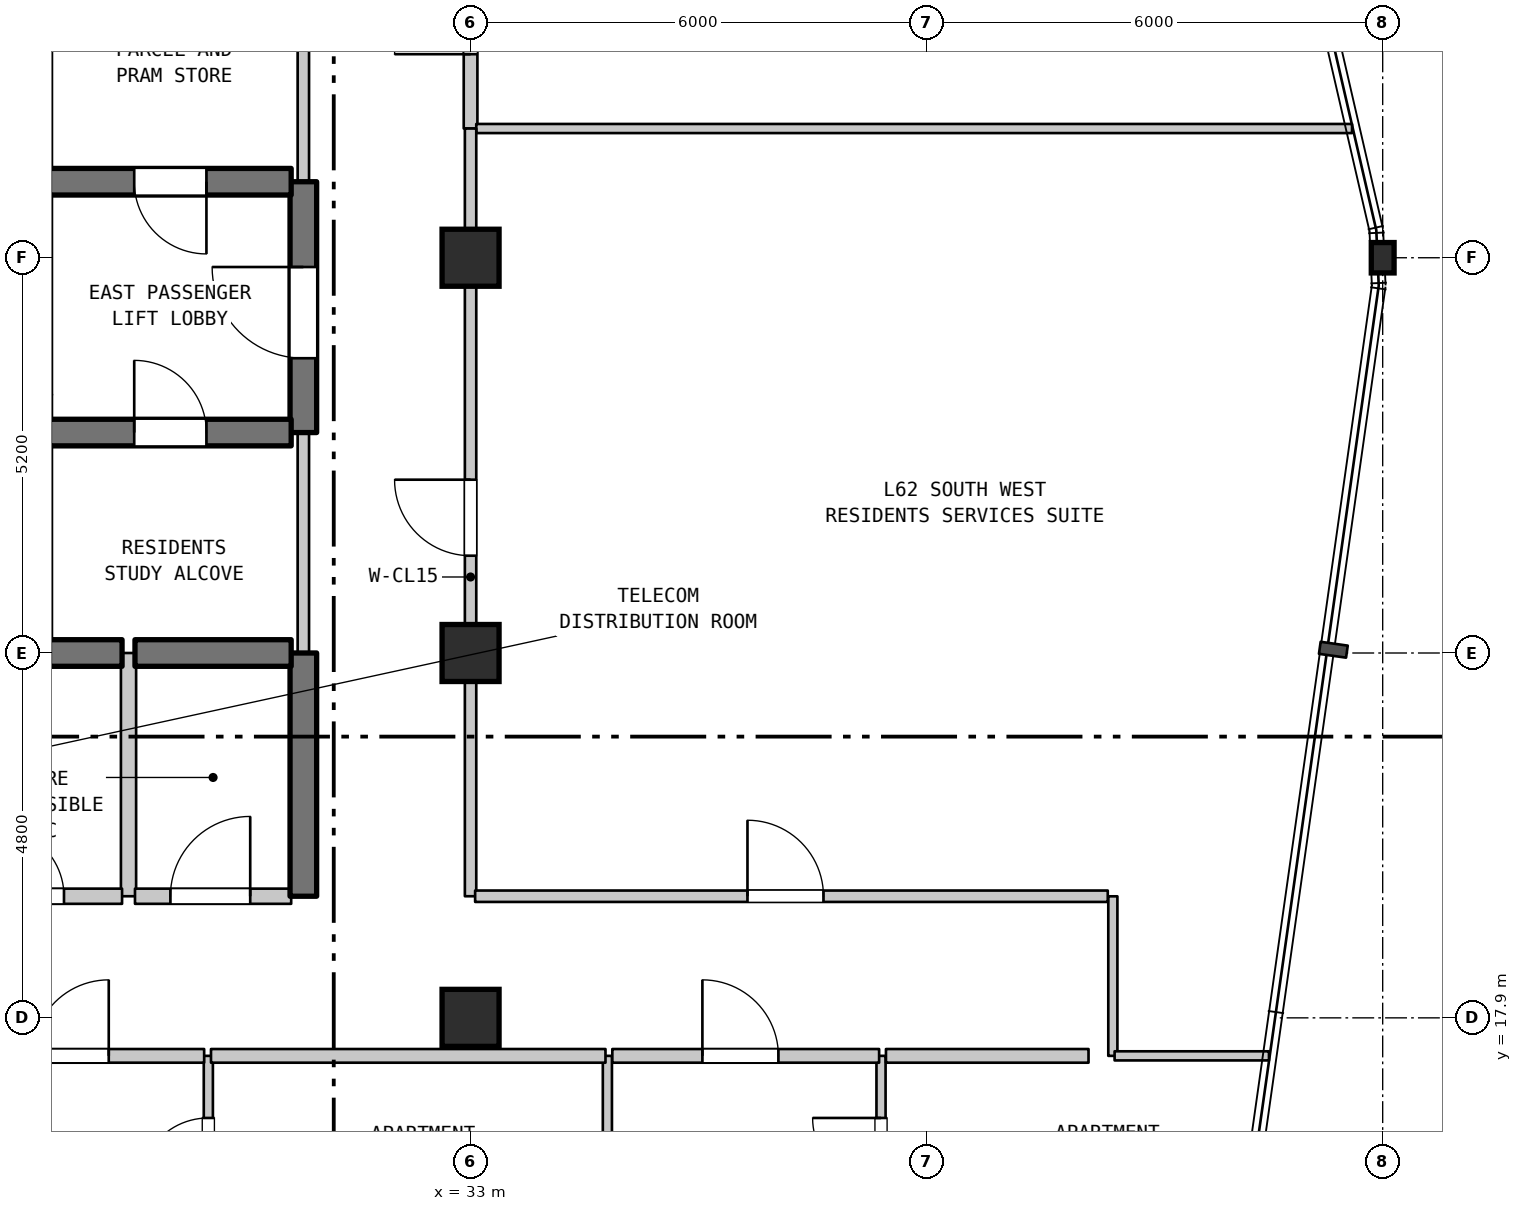
"""IFC4 building model, lengths in metres.
Left out: names, types, materials, properties, quantities, classifications, styles, units other than length and angle.
Written with IfcOpenShell. Run it as: python <this file> out.ifc"""

import sys

from ifc_helpers import new_model, si_unit, direction, frame, frame_2d, origin, origin_2d, place, context, subcontext, project, spatial, rectangle, i_section, extrude, element, fill, save


model = new_model("IFC4")
c1 = context("Model", 3, precision=1e-05, world=origin(), true_north=direction((0.0, 1.0)))
c2 = subcontext(c1, "Body", "Model", "MODEL_VIEW")
j1 = project(units=[si_unit("LENGTHUNIT", "METRE"), si_unit("PLANEANGLEUNIT", "RADIAN")], contexts=[c1])
p1 = place(None, origin())
s1 = spatial("IfcSite", under=j1, at=p1, CompositionType="ELEMENT")
p2 = place(p1, origin())
s2 = spatial("IfcBuilding", under=s1, at=p2, CompositionType="ELEMENT")
p3 = place(p2, frame((0.0, 0.0, 251.0)))
s3 = spatial("IfcBuildingStorey", under=s2, at=p3, CompositionType="ELEMENT", Elevation=251.0)
for number, where, z_axis, x_axis in (
    (1, (33.0, 17.9, 0.0), (0.0, 0.0, 1.0), (1.0, 0.0, 0.0)),
    (2, (33.0, 22.7, 0.0), (0.0, 0.0, 1.0), (1.0, 0.0, 0.0)),
    (3, (33.0, 27.9, 0.0), (0.0, 0.0, 1.0), (1.0, 0.0, 0.0)),
):
    element("IfcColumn", number, at=place(p3, frame(where, z_axis=z_axis, x_axis=x_axis)), inside=s3, PredefinedType="COLUMN", context=c2, shape_type="SweptSolid", body=[
        extrude(rectangle(XDim=0.75, YDim=0.75, at=origin_2d()), origin(), (0.0, 0.0, 1.0), 3.7),
    ])
p4 = place(p3, frame((45.0, 27.9, 0.0), z_axis=(0.0, 0.0, 1.0), x_axis=(1.0, 0.0, 0.0)))
e4 = element("IfcColumn", 4, at=p4, inside=s3, PredefinedType="COLUMN", context=c2, shape_type="SweptSolid", body=[
    extrude(i_section(OverallWidth=0.3, OverallDepth=0.4, WebThickness=0.013, FlangeThickness=0.024, FilletRadius=0.027, at=origin_2d()), origin(), (0.0, 0.0, 1.0), 3.7),
])
p5 = place(p3, frame((28.5, 19.5, 0.0), z_axis=(0.0, 0.0, 1.0), x_axis=(0.0, 1.0, 0.0)))
e5 = element("IfcWall", 5, at=p5, inside=s3, PredefinedType="STANDARD", context=c2, shape_type="SweptSolid", body=[
    extrude(rectangle(XDim=3.2, YDim=0.2, at=frame_2d((1.6, 0.0))), origin(), (0.0, 0.0, 1.0), 3.39),
])
p6 = place(p3, frame((29.55, 15.008, 0.0), z_axis=(0.0, 0.0, 1.0), x_axis=(0.0, 1.0, 0.0)))
e6 = element("IfcWall", 6, at=p6, inside=s3, PredefinedType="PARTITIONING", context=c2, shape_type="SweptSolid", body=[
    extrude(rectangle(XDim=2.392, YDim=0.12, at=frame_2d((1.196, 0.0))), origin(), (0.0, 0.0, 1.0), 3.39),
])
p7 = place(p6, frame((0.675, 0.0, 0.0)))
e7 = element("IfcOpeningElement", 7, at=p7, cuts=e6, PredefinedType="OPENING", context=c2, shape_type="SweptSolid", body=[
    extrude(rectangle(XDim=0.9, YDim=2.1, at=frame_2d((0.45, 1.05))), frame((0.0, 0.07, 0.0), z_axis=(0.0, -1.0, 0.0), x_axis=(1.0, 0.0, 0.0)), (0.0, 0.0, 1.0), 0.14),
])
p8 = place(p3, frame((30.8, 19.5, 0.0), z_axis=(0.0, 0.0, 1.0), x_axis=(0.0, 1.0, 0.0)))
e8 = element("IfcWall", 8, at=p8, inside=s3, PredefinedType="SHEAR", context=c2, shape_type="SweptSolid", body=[
    extrude(rectangle(XDim=3.2, YDim=0.35, at=frame_2d((1.6, 0.0))), origin(), (0.0, 0.0, 1.0), 3.39),
])
p9 = place(p3, frame((30.8, 22.7, 0.0), z_axis=(0.0, 0.0, 1.0), x_axis=(0.0, 1.0, 0.0)))
e9 = element("IfcWall", 9, at=p9, inside=s3, PredefinedType="STANDARD", context=c2, shape_type="SweptSolid", body=[
    extrude(rectangle(XDim=2.9, YDim=0.15, at=frame_2d((1.45, 0.0))), origin(), (0.0, 0.0, 1.0), 3.39),
])
p10 = place(p3, frame((30.8, 25.6, 0.0), z_axis=(0.0, 0.0, 1.0), x_axis=(0.0, 1.0, 0.0)))
e10 = element("IfcWall", 10, at=p10, inside=s3, PredefinedType="SHEAR", context=c2, shape_type="SweptSolid", body=[
    extrude(rectangle(XDim=3.3, YDim=0.35, at=frame_2d((1.65, 0.0))), origin(), (0.0, 0.0, 1.0), 3.39),
])
p11 = place(p10, frame((0.978, 0.0, 0.0)))
e11 = element("IfcOpeningElement", 11, at=p11, cuts=e10, PredefinedType="OPENING", context=c2, shape_type="SweptSolid", body=[
    extrude(rectangle(XDim=1.2, YDim=2.2, at=frame_2d((0.6, 1.1))), frame((0.0, 0.185, 0.0), z_axis=(0.0, -1.0, 0.0), x_axis=(1.0, 0.0, 0.0)), (0.0, 0.0, 1.0), 0.37),
])
p12 = place(p3, frame((30.8, 28.9, 0.0), z_axis=(0.0, 0.0, 1.0), x_axis=(0.0, 1.0, 0.0)))
e12 = element("IfcWall", 12, at=p12, inside=s3, PredefinedType="STANDARD", context=c2, shape_type="SweptSolid", body=[
    extrude(rectangle(XDim=2.6, YDim=0.15, at=frame_2d((1.3, 0.0))), origin(), (0.0, 0.0, 1.0), 3.39),
])
p13 = place(p3, frame((33.0, 19.5, 0.0), z_axis=(0.0, 0.0, 1.0), x_axis=(0.0, 1.0, 0.0)))
e13 = element("IfcWall", 13, at=p13, inside=s3, PredefinedType="STANDARD", context=c2, shape_type="SweptSolid", body=[
    extrude(rectangle(XDim=8.4, YDim=0.15, at=frame_2d((4.2, 0.0))), origin(), (0.0, 0.0, 1.0), 3.1),
])
p14 = place(p13, frame((4.48, 0.0, 0.0)))
e14 = element("IfcOpeningElement", 14, at=p14, cuts=e13, PredefinedType="OPENING", context=c2, shape_type="SweptSolid", body=[
    extrude(rectangle(XDim=1.0, YDim=2.15, at=frame_2d((0.5, 1.075))), frame((0.0, 0.085, 0.0), z_axis=(0.0, -1.0, 0.0), x_axis=(1.0, 0.0, 0.0)), (0.0, 0.0, 1.0), 0.17),
])
p15 = place(p3, frame((33.0, 29.6, 0.0), z_axis=(0.0, 0.0, 1.0), x_axis=(0.0, 1.0, 0.0)))
e15 = element("IfcWall", 15, at=p15, inside=s3, PredefinedType="STANDARD", context=c2, shape_type="SweptSolid", body=[
    extrude(rectangle(XDim=3.1, YDim=0.18, at=frame_2d((1.55, 0.0))), origin(), (0.0, 0.0, 1.0), 2.89),
])
p16 = place(p15, frame((0.978, 0.0, 0.0)))
e16 = element("IfcOpeningElement", 16, at=p16, cuts=e15, PredefinedType="OPENING", context=c2, shape_type="SweptSolid", body=[
    extrude(rectangle(XDim=1.0, YDim=2.15, at=frame_2d((0.5, 1.075))), frame((0.0, 0.1, 0.0), z_axis=(0.0, -1.0, 0.0), x_axis=(1.0, 0.0, 0.0)), (0.0, 0.0, 1.0), 0.2),
])
p17 = place(p3, frame((34.8, 15.008, 0.0), z_axis=(0.0, 0.0, 1.0), x_axis=(0.0, 1.0, 0.0)))
e17 = element("IfcWall", 17, at=p17, inside=s3, PredefinedType="PARTITIONING", context=c2, shape_type="SweptSolid", body=[
    extrude(rectangle(XDim=2.392, YDim=0.12, at=frame_2d((1.196, 0.0))), origin(), (0.0, 0.0, 1.0), 3.39),
])
p18 = place(p3, frame((38.4, 15.008, 0.0), z_axis=(0.0, 0.0, 1.0), x_axis=(0.0, 1.0, 0.0)))
e18 = element("IfcWall", 18, at=p18, inside=s3, PredefinedType="PARTITIONING", context=c2, shape_type="SweptSolid", body=[
    extrude(rectangle(XDim=2.392, YDim=0.12, at=frame_2d((1.196, 0.0))), origin(), (0.0, 0.0, 1.0), 3.39),
])
p19 = place(p18, frame((0.675, 0.0, 0.0)))
e19 = element("IfcOpeningElement", 19, at=p19, cuts=e18, PredefinedType="OPENING", context=c2, shape_type="SweptSolid", body=[
    extrude(rectangle(XDim=0.9, YDim=2.1, at=frame_2d((0.45, 1.05))), frame((0.0, 0.07, 0.0), z_axis=(0.0, -1.0, 0.0), x_axis=(1.0, 0.0, 0.0)), (0.0, 0.0, 1.0), 0.14),
])
p20 = place(p3, frame((41.45, 17.4, 0.0), z_axis=(0.0, 0.0, 1.0), x_axis=(0.0, 1.0, 0.0)))
e20 = element("IfcWall", 20, at=p20, inside=s3, PredefinedType="PARTITIONING", context=c2, shape_type="SweptSolid", body=[
    extrude(rectangle(XDim=2.099, YDim=0.12, at=frame_2d((1.05, 0.0))), origin(), (0.0, 0.0, 1.0), 3.39),
])
p21 = place(p3, frame((25.985, 17.4, 0.0), z_axis=(0.0, 0.0, 1.0), x_axis=(1.0, 0.0, 0.0)))
e21 = element("IfcWall", 21, at=p21, inside=s3, PredefinedType="STANDARD", context=c2, shape_type="SweptSolid", body=[
    extrude(rectangle(XDim=3.51, YDim=0.18, at=frame_2d((1.755, 0.0))), origin(), (0.0, 0.0, 1.0), 3.39),
])
p22 = place(p21, frame((1.255, 0.0, 0.0)))
e22 = element("IfcOpeningElement", 22, at=p22, cuts=e21, PredefinedType="OPENING", context=c2, shape_type="SweptSolid", body=[
    extrude(rectangle(XDim=1.0, YDim=2.15, at=frame_2d((0.5, 1.075))), frame((0.0, 0.1, 0.0), z_axis=(0.0, -1.0, 0.0), x_axis=(1.0, 0.0, 0.0)), (0.0, 0.0, 1.0), 0.2),
])
p23 = place(p3, frame((29.585, 17.4, 0.0), z_axis=(0.0, 0.0, 1.0), x_axis=(1.0, 0.0, 0.0)))
e23 = element("IfcWall", 23, at=p23, inside=s3, PredefinedType="STANDARD", context=c2, shape_type="SweptSolid", body=[
    extrude(rectangle(XDim=5.19, YDim=0.18, at=frame_2d((2.595, 0.0))), origin(), (0.0, 0.0, 1.0), 3.39),
])
p24 = place(p3, frame((34.865, 17.4, 0.0), z_axis=(0.0, 0.0, 1.0), x_axis=(1.0, 0.0, 0.0)))
e24 = element("IfcWall", 24, at=p24, inside=s3, PredefinedType="STANDARD", context=c2, shape_type="SweptSolid", body=[
    extrude(rectangle(XDim=3.51, YDim=0.18, at=frame_2d((1.755, 0.0))), origin(), (0.0, 0.0, 1.0), 3.39),
])
p25 = place(p24, frame((1.185, 0.0, 0.0)))
e25 = element("IfcOpeningElement", 25, at=p25, cuts=e24, PredefinedType="OPENING", context=c2, shape_type="SweptSolid", body=[
    extrude(rectangle(XDim=1.0, YDim=2.15, at=frame_2d((0.5, 1.075))), frame((0.0, 0.1, 0.0), z_axis=(0.0, -1.0, 0.0), x_axis=(1.0, 0.0, 0.0)), (0.0, 0.0, 1.0), 0.2),
])
p26 = place(p3, frame((38.465, 17.4, 0.0), z_axis=(0.0, 0.0, 1.0), x_axis=(1.0, 0.0, 0.0)))
e26 = element("IfcWall", 26, at=p26, inside=s3, PredefinedType="STANDARD", context=c2, shape_type="SweptSolid", body=[
    extrude(rectangle(XDim=2.665, YDim=0.18, at=frame_2d((1.333, 0.0))), origin(), (0.0, 0.0, 1.0), 3.39),
])
p27 = place(p3, frame((41.473, 17.4, 0.0), z_axis=(0.0, 0.0, 1.0), x_axis=(1.0, 0.0, 0.0)))
e27 = element("IfcWall", 27, at=p27, inside=s3, PredefinedType="PARTITIONING", context=c2, shape_type="SweptSolid", body=[
    extrude(rectangle(XDim=2.031, YDim=0.12, at=frame_2d((1.016, 0.0))), origin(), (0.0, 0.0, 1.0), 3.39),
])
p28 = place(p3, frame((23.96, 19.5, 0.0), z_axis=(0.0, 0.0, 1.0), x_axis=(1.0, 0.0, 0.0)))
e28 = element("IfcWall", 28, at=p28, inside=s3, PredefinedType="STANDARD", context=c2, shape_type="SweptSolid", body=[
    extrude(rectangle(XDim=4.455, YDim=0.2, at=frame_2d((2.228, 0.0))), origin(), (0.0, 0.0, 1.0), 3.39),
])
p29 = place(p28, frame((0.665, 0.0, 0.0)))
e29 = element("IfcOpeningElement", 29, at=p29, cuts=e28, PredefinedType="OPENING", context=c2, shape_type="SweptSolid", body=[
    extrude(rectangle(XDim=0.9, YDim=2.15, at=frame_2d((0.45, 1.075))), frame((0.0, 0.11, 0.0), z_axis=(0.0, -1.0, 0.0), x_axis=(1.0, 0.0, 0.0)), (0.0, 0.0, 1.0), 0.22),
])
p30 = place(p28, frame((2.791, 0.0, 0.0)))
e30 = element("IfcOpeningElement", 30, at=p30, cuts=e28, PredefinedType="OPENING", context=c2, shape_type="SweptSolid", body=[
    extrude(rectangle(XDim=0.9, YDim=2.15, at=frame_2d((0.45, 1.075))), frame((0.0, 0.11, 0.0), z_axis=(0.0, -1.0, 0.0), x_axis=(1.0, 0.0, 0.0)), (0.0, 0.0, 1.0), 0.22),
])
p31 = place(p3, frame((28.585, 19.5, 0.0), z_axis=(0.0, 0.0, 1.0), x_axis=(1.0, 0.0, 0.0)))
e31 = element("IfcWall", 31, at=p31, inside=s3, PredefinedType="STANDARD", context=c2, shape_type="SweptSolid", body=[
    extrude(rectangle(XDim=2.055, YDim=0.2, at=frame_2d((1.027, 0.0))), origin(), (0.0, 0.0, 1.0), 3.39),
])
p32 = place(p31, frame((0.466, 0.0, 0.0)))
e32 = element("IfcOpeningElement", 32, at=p32, cuts=e31, PredefinedType="OPENING", context=c2, shape_type="SweptSolid", body=[
    extrude(rectangle(XDim=1.05, YDim=2.15, at=frame_2d((0.525, 1.075))), frame((0.0, 0.11, 0.0), z_axis=(0.0, -1.0, 0.0), x_axis=(1.0, 0.0, 0.0)), (0.0, 0.0, 1.0), 0.22),
])
p33 = place(p3, frame((33.06, 19.5, 0.0), z_axis=(0.0, 0.0, 1.0), x_axis=(1.0, 0.0, 0.0)))
e33 = element("IfcWall", 33, at=p33, inside=s3, PredefinedType="STANDARD", context=c2, shape_type="SweptSolid", body=[
    extrude(rectangle(XDim=8.323, YDim=0.15, at=frame_2d((4.162, 0.0))), origin(), (0.0, 0.0, 1.0), 3.39),
])
p34 = place(p33, frame((3.583, 0.0, 0.0)))
e34 = element("IfcOpeningElement", 34, at=p34, cuts=e33, PredefinedType="OPENING", context=c2, shape_type="SweptSolid", body=[
    extrude(rectangle(XDim=1.0, YDim=2.15, at=frame_2d((0.5, 1.075))), frame((0.0, 0.085, 0.0), z_axis=(0.0, -1.0, 0.0), x_axis=(1.0, 0.0, 0.0)), (0.0, 0.0, 1.0), 0.17),
])
p35 = place(p3, frame((27.46, 22.7, 0.0), z_axis=(0.0, 0.0, 1.0), x_axis=(1.0, 0.0, 0.0)))
e35 = element("IfcWall", 35, at=p35, inside=s3, PredefinedType="SHEAR", context=c2, shape_type="SweptSolid", body=[
    extrude(rectangle(XDim=0.955, YDim=0.35, at=frame_2d((0.478, 0.0))), origin(), (0.0, 0.0, 1.0), 3.39),
])
p36 = place(p3, frame((28.585, 22.7, 0.0), z_axis=(0.0, 0.0, 1.0), x_axis=(1.0, 0.0, 0.0)))
e36 = element("IfcWall", 36, at=p36, inside=s3, PredefinedType="SHEAR", context=c2, shape_type="SweptSolid", body=[
    extrude(rectangle(XDim=2.055, YDim=0.35, at=frame_2d((1.027, 0.0))), origin(), (0.0, 0.0, 1.0), 3.39),
])
p37 = place(p3, frame((27.46, 25.6, 0.0), z_axis=(0.0, 0.0, 1.0), x_axis=(1.0, 0.0, 0.0)))
e37 = element("IfcWall", 37, at=p37, inside=s3, PredefinedType="SHEAR", context=c2, shape_type="SweptSolid", body=[
    extrude(rectangle(XDim=3.18, YDim=0.35, at=frame_2d((1.59, 0.0))), origin(), (0.0, 0.0, 1.0), 3.39),
])
p38 = place(p37, frame((1.115, 0.0, 0.0)))
e38 = element("IfcOpeningElement", 38, at=p38, cuts=e37, PredefinedType="OPENING", context=c2, shape_type="SweptSolid", body=[
    extrude(rectangle(XDim=0.95, YDim=2.15, at=frame_2d((0.475, 1.075))), frame((0.0, 0.185, 0.0), z_axis=(0.0, -1.0, 0.0), x_axis=(1.0, 0.0, 0.0)), (0.0, 0.0, 1.0), 0.37),
])
p39 = place(p3, frame((27.46, 28.9, 0.0), z_axis=(0.0, 0.0, 1.0), x_axis=(1.0, 0.0, 0.0)))
e39 = element("IfcWall", 39, at=p39, inside=s3, PredefinedType="SHEAR", context=c2, shape_type="SweptSolid", body=[
    extrude(rectangle(XDim=3.18, YDim=0.35, at=frame_2d((1.59, 0.0))), origin(), (0.0, 0.0, 1.0), 3.39),
])
p40 = place(p39, frame((1.115, 0.0, 0.0)))
e40 = element("IfcOpeningElement", 40, at=p40, cuts=e39, PredefinedType="OPENING", context=c2, shape_type="SweptSolid", body=[
    extrude(rectangle(XDim=0.95, YDim=2.15, at=frame_2d((0.475, 1.075))), frame((0.0, 0.185, 0.0), z_axis=(0.0, -1.0, 0.0), x_axis=(1.0, 0.0, 0.0)), (0.0, 0.0, 1.0), 0.37),
])
p41 = place(p3, frame((33.075, 29.6, 0.0), z_axis=(0.0, 0.0, 1.0), x_axis=(1.0, 0.0, 0.0)))
e41 = element("IfcWall", 41, at=p41, inside=s3, PredefinedType="PARTITIONING", context=c2, shape_type="SweptSolid", body=[
    extrude(rectangle(XDim=11.522, YDim=0.12, at=frame_2d((5.761, 0.0))), origin(), (0.0, 0.0, 1.0), 3.39),
])
p42 = place(p3, frame((33.0, 27.9, 0.0), z_axis=(0.0, 0.0, 1.0), x_axis=(0.0, 1.0, 0.0)))
e42 = element("IfcWall", 42, at=p42, inside=s3, PredefinedType="STANDARD", context=c2, shape_type="SweptSolid", body=[
    extrude(rectangle(XDim=1.7, YDim=0.15, at=frame_2d((0.85, 0.0))), origin(), (0.0, 0.0, 1.0), 2.89),
])
p43 = place(p7, origin())
e43 = element("IfcDoor", 43, at=p43, inside=s3, OperationType="SINGLE_SWING_LEFT", PredefinedType="DOOR", context=c2, shape_type="SweptSolid", body=[
    extrude(rectangle(XDim=0.9, YDim=2.1, at=frame_2d((0.45, 1.05))), frame((0.0, 0.025, 0.0), z_axis=(0.0, -1.0, 0.0), x_axis=(1.0, 0.0, 0.0)), (0.0, 0.0, 1.0), 0.05),
])
fill(e7, e43)
p44 = place(p11, origin())
e44 = element("IfcDoor", 44, at=p44, inside=s3, OperationType="SINGLE_SWING_RIGHT", PredefinedType="DOOR", context=c2, shape_type="SweptSolid", body=[
    extrude(rectangle(XDim=1.2, YDim=2.2, at=frame_2d((0.6, 1.1))), frame((0.0, 0.025, 0.0), z_axis=(0.0, -1.0, 0.0), x_axis=(1.0, 0.0, 0.0)), (0.0, 0.0, 1.0), 0.05),
])
fill(e11, e44)
p45 = place(p14, origin())
e45 = element("IfcDoor", 45, at=p45, inside=s3, OperationType="SINGLE_SWING_RIGHT", PredefinedType="DOOR", context=c2, shape_type="SweptSolid", body=[
    extrude(rectangle(XDim=1.0, YDim=2.15, at=frame_2d((0.5, 1.075))), frame((0.0, 0.025, 0.0), z_axis=(0.0, -1.0, 0.0), x_axis=(1.0, 0.0, 0.0)), (0.0, 0.0, 1.0), 0.05),
])
fill(e14, e45)
p46 = place(p16, origin())
e46 = element("IfcDoor", 46, at=p46, inside=s3, OperationType="SINGLE_SWING_LEFT", PredefinedType="DOOR", context=c2, shape_type="SweptSolid", body=[
    extrude(rectangle(XDim=1.0, YDim=2.15, at=frame_2d((0.5, 1.075))), frame((0.0, 0.025, 0.0), z_axis=(0.0, -1.0, 0.0), x_axis=(1.0, 0.0, 0.0)), (0.0, 0.0, 1.0), 0.05),
])
fill(e16, e46)
p47 = place(p19, origin())
e47 = element("IfcDoor", 47, at=p47, inside=s3, OperationType="SINGLE_SWING_RIGHT", PredefinedType="DOOR", context=c2, shape_type="SweptSolid", body=[
    extrude(rectangle(XDim=0.9, YDim=2.1, at=frame_2d((0.45, 1.05))), frame((0.0, 0.025, 0.0), z_axis=(0.0, -1.0, 0.0), x_axis=(1.0, 0.0, 0.0)), (0.0, 0.0, 1.0), 0.05),
])
fill(e19, e47)
p48 = place(p22, origin())
e48 = element("IfcDoor", 48, at=p48, inside=s3, OperationType="SINGLE_SWING_RIGHT", PredefinedType="DOOR", context=c2, shape_type="SweptSolid", body=[
    extrude(rectangle(XDim=1.0, YDim=2.15, at=frame_2d((0.5, 1.075))), frame((0.0, 0.025, 0.0), z_axis=(0.0, -1.0, 0.0), x_axis=(1.0, 0.0, 0.0)), (0.0, 0.0, 1.0), 0.05),
])
fill(e22, e48)
p49 = place(p25, origin())
e49 = element("IfcDoor", 49, at=p49, inside=s3, OperationType="SINGLE_SWING_LEFT", PredefinedType="DOOR", context=c2, shape_type="SweptSolid", body=[
    extrude(rectangle(XDim=1.0, YDim=2.15, at=frame_2d((0.5, 1.075))), frame((0.0, 0.025, 0.0), z_axis=(0.0, -1.0, 0.0), x_axis=(1.0, 0.0, 0.0)), (0.0, 0.0, 1.0), 0.05),
])
fill(e25, e49)
p50 = place(p30, origin())
e50 = element("IfcDoor", 50, at=p50, inside=s3, OperationType="SINGLE_SWING_LEFT", PredefinedType="DOOR", context=c2, shape_type="SweptSolid", body=[
    extrude(rectangle(XDim=0.9, YDim=2.15, at=frame_2d((0.45, 1.075))), frame((0.0, 0.025, 0.0), z_axis=(0.0, -1.0, 0.0), x_axis=(1.0, 0.0, 0.0)), (0.0, 0.0, 1.0), 0.05),
])
fill(e30, e50)
p51 = place(p32, origin())
e51 = element("IfcDoor", 51, at=p51, inside=s3, OperationType="SINGLE_SWING_RIGHT", PredefinedType="DOOR", context=c2, shape_type="SweptSolid", body=[
    extrude(rectangle(XDim=1.05, YDim=2.15, at=frame_2d((0.525, 1.075))), frame((0.0, 0.025, 0.0), z_axis=(0.0, -1.0, 0.0), x_axis=(1.0, 0.0, 0.0)), (0.0, 0.0, 1.0), 0.05),
])
fill(e32, e51)
p52 = place(p34, origin())
e52 = element("IfcDoor", 52, at=p52, inside=s3, OperationType="SINGLE_SWING_LEFT", PredefinedType="DOOR", context=c2, shape_type="SweptSolid", body=[
    extrude(rectangle(XDim=1.0, YDim=2.15, at=frame_2d((0.5, 1.075))), frame((0.0, 0.025, 0.0), z_axis=(0.0, -1.0, 0.0), x_axis=(1.0, 0.0, 0.0)), (0.0, 0.0, 1.0), 0.05),
])
fill(e34, e52)
p53 = place(p38, origin())
e53 = element("IfcDoor", 53, at=p53, inside=s3, OperationType="SINGLE_SWING_LEFT", PredefinedType="DOOR", context=c2, shape_type="SweptSolid", body=[
    extrude(rectangle(XDim=0.95, YDim=2.15, at=frame_2d((0.475, 1.075))), frame((0.0, 0.025, 0.0), z_axis=(0.0, -1.0, 0.0), x_axis=(1.0, 0.0, 0.0)), (0.0, 0.0, 1.0), 0.05),
])
fill(e38, e53)
p54 = place(p40, frame((0.95, 0.0, 0.0), z_axis=(0.0, 0.0, 1.0), x_axis=(-1.0, 0.0, 0.0)))
e54 = element("IfcDoor", 54, at=p54, inside=s3, OperationType="SINGLE_SWING_RIGHT", PredefinedType="DOOR", context=c2, shape_type="SweptSolid", body=[
    extrude(rectangle(XDim=0.95, YDim=2.15, at=frame_2d((0.475, 1.075))), frame((0.0, 0.025, 0.0), z_axis=(0.0, -1.0, 0.0), x_axis=(1.0, 0.0, 0.0)), (0.0, 0.0, 1.0), 0.05),
])
fill(e40, e54)
save(model, sys.argv[1])
